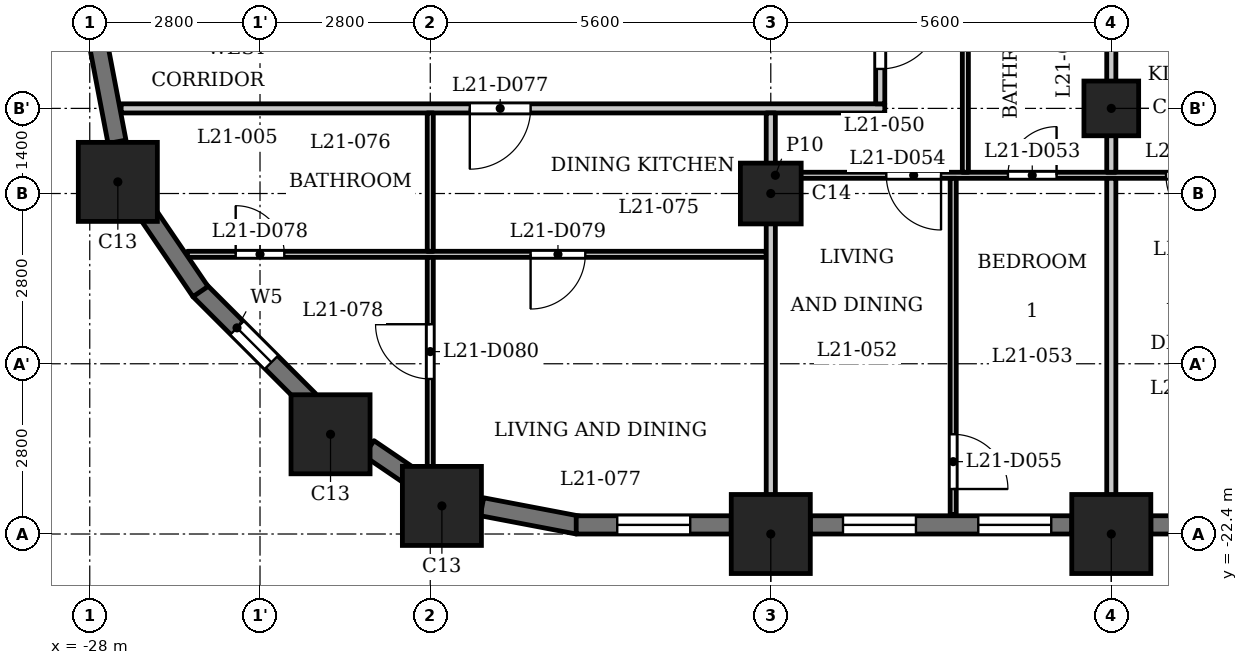
"""IFC4 building model, lengths in metres.
Left out: names, types, materials, properties, quantities, classifications, styles, units other than length and angle.
Written with IfcOpenShell. Run it as: python <this file> out.ifc"""

import sys

from ifc_helpers import new_model, si_unit, direction, frame, frame_2d, origin, origin_2d, place, context, subcontext, project, spatial, rectangle, extrude, element, fill, save


model = new_model("IFC4")
c1 = context("Model", 3, precision=1e-05, world=origin(), true_north=direction((0.0, 1.0)))
c2 = subcontext(c1, "Body", "Model", "MODEL_VIEW")
j1 = project(units=[si_unit("LENGTHUNIT", "METRE"), si_unit("PLANEANGLEUNIT", "RADIAN")], contexts=[c1])
p1 = place(None, origin())
s1 = spatial("IfcSite", under=j1, at=p1, CompositionType="ELEMENT")
p2 = place(p1, origin())
s2 = spatial("IfcBuilding", under=s1, at=p2, CompositionType="ELEMENT")
p3 = place(p2, frame((0.0, 0.0, 86.8)))
s3 = spatial("IfcBuildingStorey", under=s2, at=p3, CompositionType="ELEMENT", Elevation=86.8)
for number, where, z_axis, x_axis in (
    (1, (-22.209, -21.938, 0.0), (0.0, 0.0, 1.0), (1.0, 0.0, 0.0)),
    (2, (-16.8, -22.4, 0.0), (0.0, 0.0, 1.0), (1.0, 0.0, 0.0)),
    (3, (-11.2, -22.4, 0.0), (0.0, 0.0, 1.0), (1.0, 0.0, 0.0)),
    (4, (-27.538, -16.609, 0.0), (0.0, 0.0, 1.0), (1.0, 0.0, 0.0)),
    (5, (-24.04, -20.76, 0.0), (0.0, 0.0, 1.0), (1.0, 0.0, 0.0)),
):
    element("IfcColumn", number, at=place(p3, frame(where, z_axis=z_axis, x_axis=x_axis)), inside=s3, PredefinedType="COLUMN", context=c2, shape_type="SweptSolid", body=[
        extrude(rectangle(XDim=1.3, YDim=1.3, at=origin_2d()), origin(), (0.0, 0.0, 1.0), 3.5),
    ])
p4 = place(p3, frame((-16.8, -16.8, 0.0), z_axis=(0.0, 0.0, 1.0), x_axis=(1.0, 0.0, 0.0)))
e6 = element("IfcColumn", 6, at=p4, inside=s3, PredefinedType="COLUMN", context=c2, shape_type="SweptSolid", body=[
    extrude(rectangle(XDim=1.0, YDim=1.0, at=origin_2d()), origin(), (0.0, 0.0, 1.0), 3.5),
])
p5 = place(p3, frame((-11.2, -15.4, 0.0), z_axis=(0.0, 0.0, 1.0), x_axis=(1.0, 0.0, 0.0)))
e7 = element("IfcColumn", 7, at=p5, inside=s3, PredefinedType="COLUMN", context=c2, shape_type="SweptSolid", body=[
    extrude(rectangle(XDim=0.9, YDim=0.9, at=origin_2d()), origin(), (0.0, 0.0, 1.0), 3.5),
])
p6 = place(p3, frame((-26.197, -18.391, 0.0), z_axis=(0.0, 0.0, 1.0), x_axis=(0.707058908279, -0.707154650853, 0.0)))
e8 = element("IfcWall", 8, at=p6, inside=s3, PredefinedType="SOLIDWALL", context=c2, shape_type="SweptSolid", body=[
    extrude(rectangle(XDim=2.55, YDim=0.3, at=frame_2d((1.275, 0.0))), origin(), (0.0, 0.0, 1.0), 2.4),
])
p7 = place(p6, frame((0.875, 0.0, 0.6)))
e9 = element("IfcOpeningElement", 9, at=p7, cuts=e8, PredefinedType="OPENING", context=c2, shape_type="SweptSolid", body=[
    extrude(rectangle(XDim=0.8, YDim=1.55, at=frame_2d((0.4, 0.775))), frame((0.0, 0.16, 0.0), z_axis=(0.0, -1.0, 0.0), x_axis=(1.0, 0.0, 0.0)), (0.0, 0.0, 1.0), 0.32),
])
p8 = place(p3, frame((-23.41, -20.989, 0.0), z_axis=(0.0, 0.0, 1.0), x_axis=(0.827050703543, -0.562127328787, 0.0)))
e10 = element("IfcWall", 10, at=p8, inside=s3, PredefinedType="SOLIDWALL", context=c2, shape_type="SweptSolid", body=[
    extrude(rectangle(XDim=0.877, YDim=0.3, at=frame_2d((0.438, 0.0))), origin(), (0.0, 0.0, 1.0), 3.2),
])
p9 = place(p3, frame((-21.55, -21.952, 0.0), z_axis=(0.0, 0.0, 1.0), x_axis=(0.982278644094, -0.187426426519, 0.0)))
e11 = element("IfcWall", 11, at=p9, inside=s3, PredefinedType="SOLIDWALL", context=c2, shape_type="SweptSolid", body=[
    extrude(rectangle(XDim=1.606, YDim=0.3, at=frame_2d((0.803, 0.0))), origin(), (0.0, 0.0, 1.0), 2.4),
])
p10 = place(p3, frame((-20.0, -22.25, 0.0), z_axis=(0.0, 0.0, 1.0), x_axis=(1.0, 0.0, 0.0)))
e12 = element("IfcWall", 12, at=p10, inside=s3, PredefinedType="SOLIDWALL", context=c2, shape_type="SweptSolid", body=[
    extrude(rectangle(XDim=2.55, YDim=0.3, at=frame_2d((1.275, 0.0))), origin(), (0.0, 0.0, 1.0), 2.4),
])
p11 = place(p10, frame((0.675, 0.0, 0.6)))
e13 = element("IfcOpeningElement", 13, at=p11, cuts=e12, PredefinedType="OPENING", context=c2, shape_type="SweptSolid", body=[
    extrude(rectangle(XDim=1.2, YDim=1.55, at=frame_2d((0.6, 0.775))), frame((0.0, 0.16, 0.0), z_axis=(0.0, -1.0, 0.0), x_axis=(1.0, 0.0, 0.0)), (0.0, 0.0, 1.0), 0.32),
])
p12 = place(p3, frame((-16.15, -22.25, 0.0), z_axis=(0.0, 0.0, 1.0), x_axis=(1.0, 0.0, 0.0)))
e14 = element("IfcWall", 14, at=p12, inside=s3, PredefinedType="SOLIDWALL", context=c2, shape_type="SweptSolid", body=[
    extrude(rectangle(XDim=4.3, YDim=0.3, at=frame_2d((2.15, 0.0))), origin(), (0.0, 0.0, 1.0), 2.4),
])
p13 = place(p12, frame((0.538, 0.0, 0.6)))
e15 = element("IfcOpeningElement", 15, at=p13, cuts=e14, PredefinedType="OPENING", context=c2, shape_type="SweptSolid", body=[
    extrude(rectangle(XDim=1.2, YDim=1.55, at=frame_2d((0.6, 0.775))), frame((0.0, 0.16, 0.0), z_axis=(0.0, -1.0, 0.0), x_axis=(1.0, 0.0, 0.0)), (0.0, 0.0, 1.0), 0.32),
])
p14 = place(p12, frame((2.762, 0.0, 0.6)))
e16 = element("IfcOpeningElement", 16, at=p14, cuts=e14, PredefinedType="OPENING", context=c2, shape_type="SweptSolid", body=[
    extrude(rectangle(XDim=1.2, YDim=1.55, at=frame_2d((0.6, 0.775))), frame((0.0, 0.16, 0.0), z_axis=(0.0, -1.0, 0.0), x_axis=(1.0, 0.0, 0.0)), (0.0, 0.0, 1.0), 0.32),
])
p15 = place(p3, frame((-10.55, -22.25, 0.0), z_axis=(0.0, 0.0, 1.0), x_axis=(1.0, 0.0, 0.0)))
e17 = element("IfcWall", 17, at=p15, inside=s3, PredefinedType="SOLIDWALL", context=c2, shape_type="SweptSolid", body=[
    extrude(rectangle(XDim=4.3, YDim=0.3, at=frame_2d((2.15, 0.0))), origin(), (0.0, 0.0, 1.0), 2.4),
])
p16 = place(p15, frame((0.337, 0.0, 0.6)))
e18 = element("IfcOpeningElement", 18, at=p16, cuts=e17, PredefinedType="OPENING", context=c2, shape_type="SweptSolid", body=[
    extrude(rectangle(XDim=1.2, YDim=1.55, at=frame_2d((0.6, 0.775))), frame((0.0, 0.16, 0.0), z_axis=(0.0, -1.0, 0.0), x_axis=(1.0, 0.0, 0.0)), (0.0, 0.0, 1.0), 0.32),
])
p17 = place(p15, frame((2.562, 0.0, 0.6)))
e19 = element("IfcOpeningElement", 19, at=p17, cuts=e17, PredefinedType="OPENING", context=c2, shape_type="SweptSolid", body=[
    extrude(rectangle(XDim=1.2, YDim=1.55, at=frame_2d((0.6, 0.775))), frame((0.0, 0.16, 0.0), z_axis=(0.0, -1.0, 0.0), x_axis=(1.0, 0.0, 0.0)), (0.0, 0.0, 1.0), 0.32),
])
for number, where, z_axis, x_axis in (
    (20, (-27.853, -14.372, 0.0), (0.0, 0.0, 1.0), (0.187, -0.982, 0.0)),
    (21, (-27.082, -17.084, 0.0), (0.0, 0.0, 1.0), (0.562, -0.827, 0.0)),
):
    element("IfcWall", number, at=place(p3, frame(where, z_axis=z_axis, x_axis=x_axis)), inside=s3, PredefinedType="SOLIDWALL", context=c2, shape_type="SweptSolid", body=[
        extrude(rectangle(XDim=1.606, YDim=0.3, at=frame_2d((0.803, 0.0))), origin(), (0.0, 0.0, 1.0), 2.4),
    ])
p18 = place(p3, frame((-26.394, -17.8, 0.0), z_axis=(0.0, 0.0, 1.0), x_axis=(1.0, 0.0, 0.0)))
e22 = element("IfcWall", 22, at=p18, inside=s3, PredefinedType="PARTITIONING", context=c2, shape_type="SweptSolid", body=[
    extrude(rectangle(XDim=9.519, YDim=0.1, at=frame_2d((4.76, 0.0))), origin(), (0.0, 0.0, 1.0), 3.2),
])
p19 = place(p18, frame((0.794, 0.0, 0.0)))
e23 = element("IfcOpeningElement", 23, at=p19, cuts=e22, PredefinedType="OPENING", context=c2, shape_type="SweptSolid", body=[
    extrude(rectangle(XDim=0.8, YDim=2.1, at=frame_2d((0.4, 1.05))), frame((0.0, 0.06, 0.0), z_axis=(0.0, -1.0, 0.0), x_axis=(1.0, 0.0, 0.0)), (0.0, 0.0, 1.0), 0.12),
])
p20 = place(p18, frame((5.644, 0.0, 0.0)))
e24 = element("IfcOpeningElement", 24, at=p20, cuts=e22, PredefinedType="OPENING", context=c2, shape_type="SweptSolid", body=[
    extrude(rectangle(XDim=0.9, YDim=2.1, at=frame_2d((0.45, 1.05))), frame((0.0, 0.06, 0.0), z_axis=(0.0, -1.0, 0.0), x_axis=(1.0, 0.0, 0.0)), (0.0, 0.0, 1.0), 0.12),
])
p21 = place(p3, frame((-16.725, -16.5, 0.0), z_axis=(0.0, 0.0, 1.0), x_axis=(1.0, 0.0, 0.0)))
e25 = element("IfcWall", 25, at=p21, inside=s3, PredefinedType="PARTITIONING", context=c2, shape_type="SweptSolid", body=[
    extrude(rectangle(XDim=33.45, YDim=0.1, at=frame_2d((16.725, 0.0))), origin(), (0.0, 0.0, 1.0), 3.2),
])
p22 = place(p21, frame((3.825, 0.0, 0.0)))
e26 = element("IfcOpeningElement", 26, at=p22, cuts=e25, PredefinedType="OPENING", context=c2, shape_type="SweptSolid", body=[
    extrude(rectangle(XDim=0.8, YDim=2.1, at=frame_2d((0.4, 1.05))), frame((0.0, 0.06, 0.0), z_axis=(0.0, -1.0, 0.0), x_axis=(1.0, 0.0, 0.0)), (0.0, 0.0, 1.0), 0.12),
])
p23 = place(p21, frame((1.825, 0.0, 0.0)))
e27 = element("IfcOpeningElement", 27, at=p23, cuts=e25, PredefinedType="OPENING", context=c2, shape_type="SweptSolid", body=[
    extrude(rectangle(XDim=0.9, YDim=2.1, at=frame_2d((0.45, 1.05))), frame((0.0, 0.06, 0.0), z_axis=(0.0, -1.0, 0.0), x_axis=(1.0, 0.0, 0.0)), (0.0, 0.0, 1.0), 0.12),
])
p24 = place(p21, frame((9.675, 0.0, 0.0)))
e28 = element("IfcOpeningElement", 28, at=p24, cuts=e25, PredefinedType="OPENING", context=c2, shape_type="SweptSolid", body=[
    extrude(rectangle(XDim=0.8, YDim=2.1, at=frame_2d((0.4, 1.05))), frame((0.0, 0.06, 0.0), z_axis=(0.0, -1.0, 0.0), x_axis=(1.0, 0.0, 0.0)), (0.0, 0.0, 1.0), 0.12),
])
p25 = place(p21, frame((6.425, 0.0, 0.0)))
e29 = element("IfcOpeningElement", 29, at=p25, cuts=e25, PredefinedType="OPENING", context=c2, shape_type="SweptSolid", body=[
    extrude(rectangle(XDim=0.9, YDim=2.1, at=frame_2d((0.45, 1.05))), frame((0.0, 0.06, 0.0), z_axis=(0.0, -1.0, 0.0), x_axis=(1.0, 0.0, 0.0)), (0.0, 0.0, 1.0), 0.12),
])
p26 = place(p21, frame((15.275, 0.0, 0.0)))
e30 = element("IfcOpeningElement", 30, at=p26, cuts=e25, PredefinedType="OPENING", context=c2, shape_type="SweptSolid", body=[
    extrude(rectangle(XDim=0.8, YDim=2.1, at=frame_2d((0.4, 1.05))), frame((0.0, 0.06, 0.0), z_axis=(0.0, -1.0, 0.0), x_axis=(1.0, 0.0, 0.0)), (0.0, 0.0, 1.0), 0.12),
])
p27 = place(p21, frame((12.025, 0.0, 0.0)))
e31 = element("IfcOpeningElement", 31, at=p27, cuts=e25, PredefinedType="OPENING", context=c2, shape_type="SweptSolid", body=[
    extrude(rectangle(XDim=0.9, YDim=2.1, at=frame_2d((0.45, 1.05))), frame((0.0, 0.06, 0.0), z_axis=(0.0, -1.0, 0.0), x_axis=(1.0, 0.0, 0.0)), (0.0, 0.0, 1.0), 0.12),
])
p28 = place(p21, frame((20.875, 0.0, 0.0)))
e32 = element("IfcOpeningElement", 32, at=p28, cuts=e25, PredefinedType="OPENING", context=c2, shape_type="SweptSolid", body=[
    extrude(rectangle(XDim=0.8, YDim=2.1, at=frame_2d((0.4, 1.05))), frame((0.0, 0.06, 0.0), z_axis=(0.0, -1.0, 0.0), x_axis=(1.0, 0.0, 0.0)), (0.0, 0.0, 1.0), 0.12),
])
p29 = place(p21, frame((18.625, 0.0, 0.0)))
e33 = element("IfcOpeningElement", 33, at=p29, cuts=e25, PredefinedType="OPENING", context=c2, shape_type="SweptSolid", body=[
    extrude(rectangle(XDim=0.9, YDim=2.1, at=frame_2d((0.45, 1.05))), frame((0.0, 0.06, 0.0), z_axis=(0.0, -1.0, 0.0), x_axis=(1.0, 0.0, 0.0)), (0.0, 0.0, 1.0), 0.12),
])
p30 = place(p21, frame((23.875, 0.0, 0.0)))
e34 = element("IfcOpeningElement", 34, at=p30, cuts=e25, PredefinedType="OPENING", context=c2, shape_type="SweptSolid", body=[
    extrude(rectangle(XDim=0.8, YDim=2.1, at=frame_2d((0.4, 1.05))), frame((0.0, 0.06, 0.0), z_axis=(0.0, -1.0, 0.0), x_axis=(1.0, 0.0, 0.0)), (0.0, 0.0, 1.0), 0.12),
])
p31 = place(p21, frame((26.225, 0.0, 0.0)))
e35 = element("IfcOpeningElement", 35, at=p31, cuts=e25, PredefinedType="OPENING", context=c2, shape_type="SweptSolid", body=[
    extrude(rectangle(XDim=0.9, YDim=2.1, at=frame_2d((0.45, 1.05))), frame((0.0, 0.06, 0.0), z_axis=(0.0, -1.0, 0.0), x_axis=(1.0, 0.0, 0.0)), (0.0, 0.0, 1.0), 0.12),
])
p32 = place(p21, frame((28.575, 0.0, 0.0)))
e36 = element("IfcOpeningElement", 36, at=p32, cuts=e25, PredefinedType="OPENING", context=c2, shape_type="SweptSolid", body=[
    extrude(rectangle(XDim=0.9, YDim=2.1, at=frame_2d((0.45, 1.05))), frame((0.0, 0.06, 0.0), z_axis=(0.0, -1.0, 0.0), x_axis=(1.0, 0.0, 0.0)), (0.0, 0.0, 1.0), 0.12),
])
p33 = place(p21, frame((30.675, 0.0, 0.0)))
e37 = element("IfcOpeningElement", 37, at=p33, cuts=e25, PredefinedType="OPENING", context=c2, shape_type="SweptSolid", body=[
    extrude(rectangle(XDim=0.9, YDim=2.1, at=frame_2d((0.45, 1.05))), frame((0.0, 0.06, 0.0), z_axis=(0.0, -1.0, 0.0), x_axis=(1.0, 0.0, 0.0)), (0.0, 0.0, 1.0), 0.12),
])
p34 = place(p3, frame((-27.484, -15.4, 0.0), z_axis=(0.0, 0.0, 1.0), x_axis=(1.0, 0.0, 0.0)))
e38 = element("IfcWall", 38, at=p34, inside=s3, PredefinedType="PARTITIONING", context=c2, shape_type="SweptSolid", body=[
    extrude(rectangle(XDim=12.559, YDim=0.15, at=frame_2d((6.279, 0.0))), origin(), (0.0, 0.0, 1.0), 3.2),
])
p35 = place(p34, frame((5.734, 0.0, 0.0)))
e39 = element("IfcOpeningElement", 39, at=p35, cuts=e38, PredefinedType="OPENING", context=c2, shape_type="SweptSolid", body=[
    extrude(rectangle(XDim=1.0, YDim=2.1, at=frame_2d((0.5, 1.05))), frame((0.0, 0.085, 0.0), z_axis=(0.0, -1.0, 0.0), x_axis=(1.0, 0.0, 0.0)), (0.0, 0.0, 1.0), 0.17),
])
p36 = place(p3, frame((-22.4, -21.72, 0.0), z_axis=(0.0, 0.0, 1.0), x_axis=(0.0, 1.0, 0.0)))
e40 = element("IfcWall", 40, at=p36, inside=s3, PredefinedType="PARTITIONING", context=c2, shape_type="SweptSolid", body=[
    extrude(rectangle(XDim=3.87, YDim=0.1, at=frame_2d((1.935, 0.0))), origin(), (0.0, 0.0, 1.0), 3.2),
])
p37 = place(p36, frame((1.87, 0.0, 0.0)))
e41 = element("IfcOpeningElement", 41, at=p37, cuts=e40, PredefinedType="OPENING", context=c2, shape_type="SweptSolid", body=[
    extrude(rectangle(XDim=0.9, YDim=2.1, at=frame_2d((0.45, 1.05))), frame((0.0, 0.06, 0.0), z_axis=(0.0, -1.0, 0.0), x_axis=(1.0, 0.0, 0.0)), (0.0, 0.0, 1.0), 0.12),
])
p38 = place(p3, frame((-22.4, -17.75, 0.0), z_axis=(0.0, 0.0, 1.0), x_axis=(0.0, 1.0, 0.0)))
e42 = element("IfcWall", 42, at=p38, inside=s3, PredefinedType="PARTITIONING", context=c2, shape_type="SweptSolid", body=[
    extrude(rectangle(XDim=2.275, YDim=0.1, at=frame_2d((1.137, 0.0))), origin(), (0.0, 0.0, 1.0), 3.2),
])
p39 = place(p3, frame((-16.8, -23.03, 0.0), z_axis=(0.0, 0.0, 1.0), x_axis=(0.0, 1.0, 0.0)))
e43 = element("IfcWall", 43, at=p39, inside=s3, PredefinedType="PARTITIONING", context=c2, shape_type="SweptSolid", body=[
    extrude(rectangle(XDim=7.555, YDim=0.15, at=frame_2d((3.777, 0.0))), origin(), (0.0, 0.0, 1.0), 3.2),
])
p40 = place(p3, frame((-15.0, -15.325, 0.0), z_axis=(0.0, 0.0, 1.0), x_axis=(0.0, 1.0, 0.0)))
e44 = element("IfcWall", 44, at=p40, inside=s3, PredefinedType="PARTITIONING", context=c2, shape_type="SweptSolid", body=[
    extrude(rectangle(XDim=2.05, YDim=0.15, at=frame_2d((1.025, 0.0))), origin(), (0.0, 0.0, 1.0), 3.2),
])
p41 = place(p40, frame((0.574, 0.0, 0.0)))
e45 = element("IfcOpeningElement", 45, at=p41, cuts=e44, PredefinedType="OPENING", context=c2, shape_type="SweptSolid", body=[
    extrude(rectangle(XDim=1.0, YDim=2.1, at=frame_2d((0.5, 1.05))), frame((0.0, 0.085, 0.0), z_axis=(0.0, -1.0, 0.0), x_axis=(1.0, 0.0, 0.0)), (0.0, 0.0, 1.0), 0.17),
])
p42 = place(p3, frame((-13.8, -22.08, 0.0), z_axis=(0.0, 0.0, 1.0), x_axis=(0.0, 1.0, 0.0)))
e46 = element("IfcWall", 46, at=p42, inside=s3, PredefinedType="PARTITIONING", context=c2, shape_type="SweptSolid", body=[
    extrude(rectangle(XDim=5.53, YDim=0.1, at=frame_2d((2.765, 0.0))), origin(), (0.0, 0.0, 1.0), 3.2),
])
p43 = place(p42, frame((0.42, 0.0, 0.0)))
e47 = element("IfcOpeningElement", 47, at=p43, cuts=e46, PredefinedType="OPENING", context=c2, shape_type="SweptSolid", body=[
    extrude(rectangle(XDim=0.9, YDim=2.1, at=frame_2d((0.45, 1.05))), frame((0.0, 0.06, 0.0), z_axis=(0.0, -1.0, 0.0), x_axis=(1.0, 0.0, 0.0)), (0.0, 0.0, 1.0), 0.12),
])
p44 = place(p3, frame((-13.6, -16.45, 0.0), z_axis=(0.0, 0.0, 1.0), x_axis=(0.0, 1.0, 0.0)))
e48 = element("IfcWall", 48, at=p44, inside=s3, PredefinedType="PARTITIONING", context=c2, shape_type="SweptSolid", body=[
    extrude(rectangle(XDim=3.175, YDim=0.1, at=frame_2d((1.587, 0.0))), origin(), (0.0, 0.0, 1.0), 3.2),
])
p45 = place(p3, frame((-11.2, -23.03, 0.0), z_axis=(0.0, 0.0, 1.0), x_axis=(0.0, 1.0, 0.0)))
e49 = element("IfcWall", 49, at=p45, inside=s3, PredefinedType="PARTITIONING", context=c2, shape_type="SweptSolid", body=[
    extrude(rectangle(XDim=6.48, YDim=0.15, at=frame_2d((3.24, 0.0))), origin(), (0.0, 0.0, 1.0), 3.2),
])
p46 = place(p3, frame((-11.2, -16.45, 0.0), z_axis=(0.0, 0.0, 1.0), x_axis=(0.0, 1.0, 0.0)))
e50 = element("IfcWall", 50, at=p46, inside=s3, PredefinedType="PARTITIONING", context=c2, shape_type="SweptSolid", body=[
    extrude(rectangle(XDim=3.175, YDim=0.15, at=frame_2d((1.587, 0.0))), origin(), (0.0, 0.0, 1.0), 3.2),
])
p47 = place(p41, origin())
e51 = element("IfcDoor", 51, at=p47, inside=s3, OperationType="SINGLE_SWING_RIGHT", PredefinedType="DOOR", context=c2, shape_type="SweptSolid", body=[
    extrude(rectangle(XDim=1.0, YDim=2.1, at=frame_2d((0.5, 1.05))), frame((0.0, 0.025, 0.0), z_axis=(0.0, -1.0, 0.0), x_axis=(1.0, 0.0, 0.0)), (0.0, 0.0, 1.0), 0.05),
])
fill(e45, e51)
p48 = place(p22, origin())
e52 = element("IfcDoor", 52, at=p48, inside=s3, OperationType="SINGLE_SWING_LEFT", PredefinedType="DOOR", context=c2, shape_type="SweptSolid", body=[
    extrude(rectangle(XDim=0.8, YDim=2.1, at=frame_2d((0.4, 1.05))), frame((0.0, 0.025, 0.0), z_axis=(0.0, -1.0, 0.0), x_axis=(1.0, 0.0, 0.0)), (0.0, 0.0, 1.0), 0.05),
])
fill(e26, e52)
p49 = place(p23, origin())
e53 = element("IfcDoor", 53, at=p49, inside=s3, OperationType="SINGLE_SWING_RIGHT", PredefinedType="DOOR", context=c2, shape_type="SweptSolid", body=[
    extrude(rectangle(XDim=0.9, YDim=2.1, at=frame_2d((0.45, 1.05))), frame((0.0, 0.025, 0.0), z_axis=(0.0, -1.0, 0.0), x_axis=(1.0, 0.0, 0.0)), (0.0, 0.0, 1.0), 0.05),
])
fill(e27, e53)
p50 = place(p43, origin())
e54 = element("IfcDoor", 54, at=p50, inside=s3, OperationType="SINGLE_SWING_LEFT", PredefinedType="DOOR", context=c2, shape_type="SweptSolid", body=[
    extrude(rectangle(XDim=0.9, YDim=2.1, at=frame_2d((0.45, 1.05))), frame((0.0, 0.025, 0.0), z_axis=(0.0, -1.0, 0.0), x_axis=(1.0, 0.0, 0.0)), (0.0, 0.0, 1.0), 0.05),
])
fill(e47, e54)
p51 = place(p25, origin())
e55 = element("IfcDoor", 55, at=p51, inside=s3, OperationType="SINGLE_SWING_RIGHT", PredefinedType="DOOR", context=c2, shape_type="SweptSolid", body=[
    extrude(rectangle(XDim=0.9, YDim=2.1, at=frame_2d((0.45, 1.05))), frame((0.0, 0.025, 0.0), z_axis=(0.0, -1.0, 0.0), x_axis=(1.0, 0.0, 0.0)), (0.0, 0.0, 1.0), 0.05),
])
fill(e29, e55)
p52 = place(p35, origin())
e56 = element("IfcDoor", 56, at=p52, inside=s3, OperationType="SINGLE_SWING_LEFT", PredefinedType="DOOR", context=c2, shape_type="SweptSolid", body=[
    extrude(rectangle(XDim=1.0, YDim=2.1, at=frame_2d((0.5, 1.05))), frame((0.0, 0.025, 0.0), z_axis=(0.0, -1.0, 0.0), x_axis=(1.0, 0.0, 0.0)), (0.0, 0.0, 1.0), 0.05),
])
fill(e39, e56)
p53 = place(p19, origin())
e57 = element("IfcDoor", 57, at=p53, inside=s3, OperationType="SINGLE_SWING_RIGHT", PredefinedType="DOOR", context=c2, shape_type="SweptSolid", body=[
    extrude(rectangle(XDim=0.8, YDim=2.1, at=frame_2d((0.4, 1.05))), frame((0.0, 0.025, 0.0), z_axis=(0.0, -1.0, 0.0), x_axis=(1.0, 0.0, 0.0)), (0.0, 0.0, 1.0), 0.05),
])
fill(e23, e57)
p54 = place(p20, origin())
e58 = element("IfcDoor", 58, at=p54, inside=s3, OperationType="SINGLE_SWING_LEFT", PredefinedType="DOOR", context=c2, shape_type="SweptSolid", body=[
    extrude(rectangle(XDim=0.9, YDim=2.1, at=frame_2d((0.45, 1.05))), frame((0.0, 0.025, 0.0), z_axis=(0.0, -1.0, 0.0), x_axis=(1.0, 0.0, 0.0)), (0.0, 0.0, 1.0), 0.05),
])
fill(e24, e58)
p55 = place(p37, origin())
e59 = element("IfcDoor", 59, at=p55, inside=s3, OperationType="SINGLE_SWING_LEFT", PredefinedType="DOOR", context=c2, shape_type="SweptSolid", body=[
    extrude(rectangle(XDim=0.9, YDim=2.1, at=frame_2d((0.45, 1.05))), frame((0.0, 0.025, 0.0), z_axis=(0.0, -1.0, 0.0), x_axis=(1.0, 0.0, 0.0)), (0.0, 0.0, 1.0), 0.05),
])
fill(e41, e59)
p56 = place(p7, origin())
e60 = element("IfcWindow", 60, at=p56, inside=s3, PartitioningType="SINGLE_PANEL", PredefinedType="WINDOW", context=c2, shape_type="SweptSolid", body=[
    extrude(rectangle(XDim=0.8, YDim=1.55, at=frame_2d((0.4, 0.775))), frame((0.0, 0.03, 0.0), z_axis=(0.0, -1.0, 0.0), x_axis=(1.0, 0.0, 0.0)), (0.0, 0.0, 1.0), 0.06),
])
fill(e9, e60)
p57 = place(p11, origin())
e61 = element("IfcWindow", 61, at=p57, inside=s3, PartitioningType="SINGLE_PANEL", PredefinedType="WINDOW", context=c2, shape_type="SweptSolid", body=[
    extrude(rectangle(XDim=1.2, YDim=1.55, at=frame_2d((0.6, 0.775))), frame((0.0, 0.03, 0.0), z_axis=(0.0, -1.0, 0.0), x_axis=(1.0, 0.0, 0.0)), (0.0, 0.0, 1.0), 0.06),
])
fill(e13, e61)
p58 = place(p13, origin())
e62 = element("IfcWindow", 62, at=p58, inside=s3, PartitioningType="SINGLE_PANEL", PredefinedType="WINDOW", context=c2, shape_type="SweptSolid", body=[
    extrude(rectangle(XDim=1.2, YDim=1.55, at=frame_2d((0.6, 0.775))), frame((0.0, 0.03, 0.0), z_axis=(0.0, -1.0, 0.0), x_axis=(1.0, 0.0, 0.0)), (0.0, 0.0, 1.0), 0.06),
])
fill(e15, e62)
p59 = place(p14, origin())
e63 = element("IfcWindow", 63, at=p59, inside=s3, PartitioningType="SINGLE_PANEL", PredefinedType="WINDOW", context=c2, shape_type="SweptSolid", body=[
    extrude(rectangle(XDim=1.2, YDim=1.55, at=frame_2d((0.6, 0.775))), frame((0.0, 0.03, 0.0), z_axis=(0.0, -1.0, 0.0), x_axis=(1.0, 0.0, 0.0)), (0.0, 0.0, 1.0), 0.06),
])
fill(e16, e63)
save(model, sys.argv[1])
